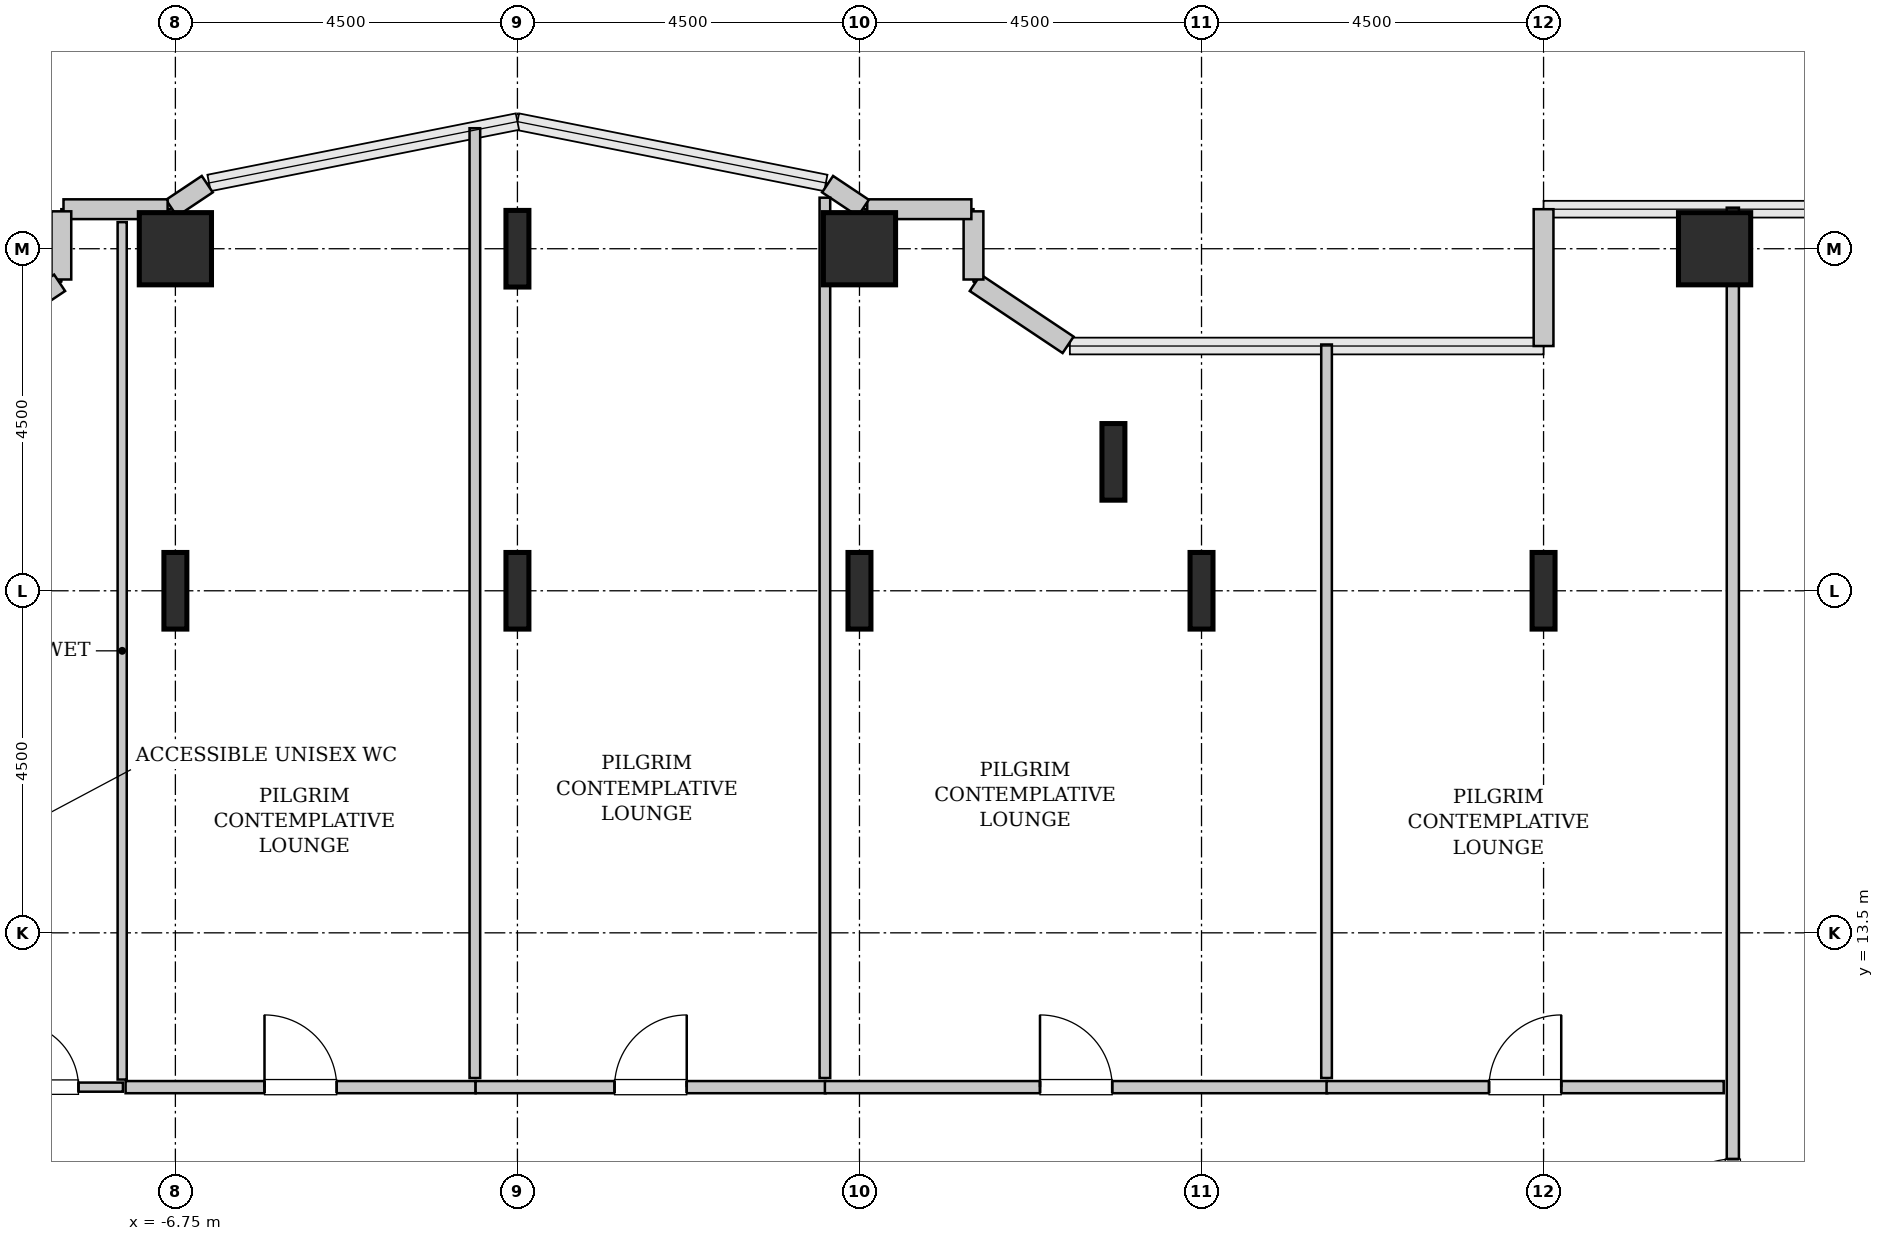
"""IFC4 building model, lengths in metres.
Left out: names, types, materials, properties, quantities, classifications, styles, units other than length and angle.
Written with IfcOpenShell. Run it as: python <this file> out.ifc"""

import sys

from ifc_helpers import new_model, si_unit, direction, frame, frame_2d, origin, origin_2d, place, context, subcontext, project, spatial, rectangle, hollow_rectangle, i_section, extrude, source, transform, mapped, element, fill, save


model = new_model("IFC4")
c1 = context("Model", 3, precision=1e-05, world=origin(), true_north=direction((0.0, 1.0)))
c2 = subcontext(c1, "Body", "Model", "MODEL_VIEW")
j1 = project(units=[si_unit("LENGTHUNIT", "METRE"), si_unit("PLANEANGLEUNIT", "RADIAN")], contexts=[c1])
p1 = place(None, origin())
s1 = spatial("IfcSite", under=j1, at=p1, CompositionType="ELEMENT")
p2 = place(p1, origin())
s2 = spatial("IfcBuilding", under=s1, at=p2, CompositionType="ELEMENT")
p3 = place(p2, frame((0.0, 0.0, 71.0)))
s3 = spatial("IfcBuildingStorey", under=s2, at=p3, CompositionType="ELEMENT", Elevation=71.0)
m1 = source(origin(), c2, "Body", "SweptSolid", [
    extrude(i_section(OverallWidth=0.302, OverallDepth=1.008, WebThickness=0.021, FlangeThickness=0.04, FilletRadius=0.03, at=origin_2d()), origin(), (0.0, 0.0, 1.0), 3.8),
])
p4 = place(p3, frame((-6.75, 18.0, 0.0), z_axis=(0.0, 0.0, 1.0), x_axis=(1.0, 0.0, 0.0)))
e1 = element("IfcColumn", 1, at=p4, inside=s3, PredefinedType="COLUMN", context=c2, shape_type="MappedRepresentation", body=[
    mapped(m1, transform((0.0, 0.0, 0.0), x_axis=(1.0, 0.0, 0.0), y_axis=(0.0, 1.0, 0.0), z_axis=(0.0, 0.0, 1.0), scale=1.0)),
])
m2 = source(origin(), c2, "Body", "SweptSolid", [
    extrude(hollow_rectangle(XDim=0.95, YDim=0.95, WallThickness=0.045, InnerFilletRadius=0.045, OuterFilletRadius=0.09, at=origin_2d()), origin(), (0.0, 0.0, 1.0), 3.8),
])
p5 = place(p3, frame((-6.75, 22.5, 0.0), z_axis=(0.0, 0.0, 1.0), x_axis=(1.0, 0.0, 0.0)))
e2 = element("IfcColumn", 2, at=p5, inside=s3, PredefinedType="COLUMN", context=c2, shape_type="MappedRepresentation", body=[
    mapped(m2, transform((0.0, 0.0, 0.0), x_axis=(1.0, 0.0, 0.0), y_axis=(0.0, 1.0, 0.0), z_axis=(0.0, 0.0, 1.0), scale=1.0)),
])
for number, where, z_axis, x_axis in (
    (3, (-2.25, 18.0, 0.0), (0.0, 0.0, 1.0), (1.0, 0.0, 0.0)),
    (4, (-2.25, 22.5, 0.0), (0.0, 0.0, 1.0), (1.0, 0.0, 0.0)),
    (5, (2.25, 18.0, 0.0), (0.0, 0.0, 1.0), (1.0, 0.0, 0.0)),
):
    element("IfcColumn", number, at=place(p3, frame(where, z_axis=z_axis, x_axis=x_axis)), inside=s3, PredefinedType="COLUMN", context=c2, shape_type="MappedRepresentation", body=[
        mapped(m1, transform((0.0, 0.0, 0.0), x_axis=(1.0, 0.0, 0.0), y_axis=(0.0, 1.0, 0.0), z_axis=(0.0, 0.0, 1.0), scale=1.0)),
    ])
p6 = place(p3, frame((2.25, 22.5, 0.0), z_axis=(0.0, 0.0, 1.0), x_axis=(1.0, 0.0, 0.0)))
e6 = element("IfcColumn", 6, at=p6, inside=s3, PredefinedType="COLUMN", context=c2, shape_type="MappedRepresentation", body=[
    mapped(m2, transform((0.0, 0.0, 0.0), x_axis=(1.0, 0.0, 0.0), y_axis=(0.0, 1.0, 0.0), z_axis=(0.0, 0.0, 1.0), scale=1.0)),
])
for number, where, z_axis, x_axis in (
    (7, (5.591, 19.696, 0.0), (0.0, 0.0, 1.0), (1.0, 0.0, 0.0)),
    (8, (6.75, 18.0, 0.0), (0.0, 0.0, 1.0), (1.0, 0.0, 0.0)),
    (9, (11.25, 18.0, 0.0), (0.0, 0.0, 1.0), (1.0, 0.0, 0.0)),
):
    element("IfcColumn", number, at=place(p3, frame(where, z_axis=z_axis, x_axis=x_axis)), inside=s3, PredefinedType="COLUMN", context=c2, shape_type="MappedRepresentation", body=[
        mapped(m1, transform((0.0, 0.0, 0.0), x_axis=(1.0, 0.0, 0.0), y_axis=(0.0, 1.0, 0.0), z_axis=(0.0, 0.0, 1.0), scale=1.0)),
    ])
p7 = place(p3, frame((13.5, 22.5, 0.0), z_axis=(0.0, 0.0, 1.0), x_axis=(1.0, 0.0, 0.0)))
e10 = element("IfcColumn", 10, at=p7, inside=s3, PredefinedType="COLUMN", context=c2, shape_type="MappedRepresentation", body=[
    mapped(m2, transform((0.0, 0.0, 0.0), x_axis=(1.0, 0.0, 0.0), y_axis=(0.0, 1.0, 0.0), z_axis=(0.0, 0.0, 1.0), scale=1.0)),
])
m3 = source(origin(), c2, "Body", "SweptSolid", [
    extrude(rectangle(XDim=1.8, YDim=0.26, at=frame_2d((0.9, 0.0))), origin(), (0.0, 0.0, 1.0), 3.55),
])
p8 = place(p3, frame((11.25, 23.02, 0.0), z_axis=(0.0, 0.0, 1.0), x_axis=(0.0, -1.0, 0.0)))
e11 = element("IfcWall", 11, at=p8, inside=s3, PredefinedType="SOLIDWALL", context=c2, shape_type="MappedRepresentation", body=[
    mapped(m3, transform((0.0, 0.0, 0.0), x_axis=(1.0, 0.0, 0.0), y_axis=(0.0, 1.0, 0.0), z_axis=(0.0, 0.0, 1.0), scale=1.0)),
])
m4 = source(origin(), c2, "Body", "SweptSolid", [
    extrude(rectangle(XDim=1.469, YDim=0.26, at=frame_2d((0.734, 0.0))), origin(), (0.0, 0.0, 1.0), 3.55),
])
p9 = place(p3, frame((4.995, 21.236, 0.0), z_axis=(0.0, 0.0, 1.0), x_axis=(-0.831461760506, 0.555581983884, 0.0)))
e12 = element("IfcWall", 12, at=p9, inside=s3, PredefinedType="SOLIDWALL", context=c2, shape_type="MappedRepresentation", body=[
    mapped(m4, transform((0.0, 0.0, 0.0), x_axis=(1.0, 0.0, 0.0), y_axis=(0.0, 1.0, 0.0), z_axis=(0.0, 0.0, 1.0), scale=1.0)),
])
m5 = source(origin(), c2, "Body", "SweptSolid", [
    extrude(rectangle(XDim=0.897, YDim=0.26, at=frame_2d((0.448, 0.0))), origin(), (0.0, 0.0, 1.0), 3.55),
])
p10 = place(p3, frame((3.75, 22.095, 0.0), z_axis=(0.0, 0.0, 1.0), x_axis=(0.0, 1.0, 0.0)))
e13 = element("IfcWall", 13, at=p10, inside=s3, PredefinedType="SOLIDWALL", context=c2, shape_type="MappedRepresentation", body=[
    mapped(m5, transform((0.0, 0.0, 0.0), x_axis=(1.0, 0.0, 0.0), y_axis=(0.0, 1.0, 0.0), z_axis=(0.0, 0.0, 1.0), scale=1.0)),
])
m6 = source(origin(), c2, "Body", "SweptSolid", [
    extrude(rectangle(XDim=1.37, YDim=0.26, at=frame_2d((0.685, 0.0))), origin(), (0.0, 0.0, 1.0), 3.55),
])
p11 = place(p3, frame((3.722, 23.02, 0.0), z_axis=(0.0, 0.0, 1.0), x_axis=(-1.0, 0.0, 0.0)))
e14 = element("IfcWall", 14, at=p11, inside=s3, PredefinedType="SOLIDWALL", context=c2, shape_type="MappedRepresentation", body=[
    mapped(m6, transform((0.0, 0.0, 0.0), x_axis=(1.0, 0.0, 0.0), y_axis=(0.0, 1.0, 0.0), z_axis=(0.0, 0.0, 1.0), scale=1.0)),
])
m7 = source(origin(), c2, "Body", "SweptSolid", [
    extrude(rectangle(XDim=0.565, YDim=0.26, at=frame_2d((0.283, 0.0))), origin(), (0.0, 0.0, 1.0), 3.55),
])
for number, where, z_axis, x_axis in (
    (15, (2.301, 23.036, 0.0), (0.0, 0.0, 1.0), (-0.832, 0.555, 0.0)),
    (16, (-6.331, 23.35, 0.0), (0.0, 0.0, 1.0), (-0.832, -0.555, 0.0)),
):
    element("IfcWall", number, at=place(p3, frame(where, z_axis=z_axis, x_axis=x_axis)), inside=s3, PredefinedType="SOLIDWALL", context=c2, shape_type="MappedRepresentation", body=[
        mapped(m7, transform((0.0, 0.0, 0.0), x_axis=(1.0, 0.0, 0.0), y_axis=(0.0, 1.0, 0.0), z_axis=(0.0, 0.0, 1.0), scale=1.0)),
    ])
p12 = place(p3, frame((-6.852, 23.02, 0.0), z_axis=(0.0, 0.0, 1.0), x_axis=(-1.0, 0.0, 0.0)))
e17 = element("IfcWall", 17, at=p12, inside=s3, PredefinedType="SOLIDWALL", context=c2, shape_type="MappedRepresentation", body=[
    mapped(m6, transform((0.0, 0.0, 0.0), x_axis=(1.0, 0.0, 0.0), y_axis=(0.0, 1.0, 0.0), z_axis=(0.0, 0.0, 1.0), scale=1.0)),
])
p13 = place(p3, frame((-8.25, 22.992, 0.0), z_axis=(0.0, 0.0, 1.0), x_axis=(0.0, -1.0, 0.0)))
e18 = element("IfcWall", 18, at=p13, inside=s3, PredefinedType="SOLIDWALL", context=c2, shape_type="MappedRepresentation", body=[
    mapped(m5, transform((0.0, 0.0, 0.0), x_axis=(1.0, 0.0, 0.0), y_axis=(0.0, 1.0, 0.0), z_axis=(0.0, 0.0, 1.0), scale=1.0)),
])
p14 = place(p3, frame((-8.273, 22.052, 0.0), z_axis=(0.0, 0.0, 1.0), x_axis=(-0.831461760506, -0.555581983884, 0.0)))
e19 = element("IfcWall", 19, at=p14, inside=s3, PredefinedType="SOLIDWALL", context=c2, shape_type="MappedRepresentation", body=[
    mapped(m4, transform((0.0, 0.0, 0.0), x_axis=(1.0, 0.0, 0.0), y_axis=(0.0, 1.0, 0.0), z_axis=(0.0, 0.0, 1.0), scale=1.0)),
])
m8 = source(origin(), c2, "Body", "SweptSolid", [
    extrude(rectangle(XDim=2.02, YDim=0.12, at=frame_2d((1.01, 0.0))), origin(), (0.0, 0.0, 1.0), 3.535),
])
p15 = place(p3, frame((-9.46, 11.47, 0.0), z_axis=(0.0, 0.0, 1.0), x_axis=(1.0, 0.0, 0.0)))
e20 = element("IfcWall", 20, at=p15, inside=s3, PredefinedType="PLUMBINGWALL", context=c2, shape_type="MappedRepresentation", body=[
    mapped(m8, transform((0.0, 0.0, 0.0), x_axis=(1.0, 0.0, 0.0), y_axis=(0.0, 1.0, 0.0), z_axis=(0.0, 0.0, 1.0), scale=1.0)),
])
p16 = place(p15, frame((0.585, 0.0, 0.0)))
e21 = element("IfcOpeningElement", 21, at=p16, cuts=e20, PredefinedType="OPENING", context=c2, shape_type="SweptSolid", body=[
    extrude(rectangle(XDim=0.85, YDim=2.1, at=frame_2d((0.425, 1.05))), frame((0.0, 0.07, 0.0), z_axis=(0.0, -1.0, 0.0), x_axis=(1.0, 0.0, 0.0)), (0.0, 0.0, 1.0), 0.14),
])
m9 = source(origin(), c2, "Body", "SweptSolid", [
    extrude(rectangle(XDim=11.28, YDim=0.12, at=frame_2d((5.64, 0.0))), origin(), (0.0, 0.0, 1.0), 3.535),
])
p17 = place(p3, frame((-7.45, 11.57, 0.0), z_axis=(0.0, 0.0, 1.0), x_axis=(0.0, 1.0, 0.0)))
e22 = element("IfcWall", 22, at=p17, inside=s3, PredefinedType="PLUMBINGWALL", context=c2, shape_type="MappedRepresentation", body=[
    mapped(m9, transform((0.0, 0.0, 0.0), x_axis=(1.0, 0.0, 0.0), y_axis=(0.0, 1.0, 0.0), z_axis=(0.0, 0.0, 1.0), scale=1.0)),
])
m10 = source(origin(), c2, "Body", "SweptSolid", [
    extrude(rectangle(XDim=14.453, YDim=0.16, at=frame_2d((7.226, 0.0))), origin(), (0.0, 0.0, 1.0), 3.535),
])
p18 = place(p3, frame((13.74, 8.587, 0.0), z_axis=(0.0, 0.0, 1.0), x_axis=(0.0, 1.0, 0.0)))
e23 = element("IfcWall", 23, at=p18, inside=s3, PredefinedType="PARTITIONING", context=c2, shape_type="MappedRepresentation", body=[
    mapped(m10, transform((0.0, 0.0, 0.0), x_axis=(1.0, 0.0, 0.0), y_axis=(0.0, 1.0, 0.0), z_axis=(0.0, 0.0, 1.0), scale=1.0)),
])
p19 = place(p18, frame((0.986, 0.0, 0.0)))
e24 = element("IfcOpeningElement", 24, at=p19, cuts=e23, PredefinedType="OPENING", context=c2, shape_type="SweptSolid", body=[
    extrude(rectangle(XDim=0.95, YDim=2.1, at=frame_2d((0.475, 1.05))), frame((0.0, 0.09, 0.0), z_axis=(0.0, -1.0, 0.0), x_axis=(1.0, 0.0, 0.0)), (0.0, 0.0, 1.0), 0.18),
])
m11 = source(origin(), c2, "Body", "SweptSolid", [
    extrude(rectangle(XDim=4.605, YDim=0.16, at=frame_2d((2.302, 0.0))), origin(), (0.0, 0.0, 1.0), 3.535),
])
p20 = place(p3, frame((-7.405, 11.47, 0.0), z_axis=(0.0, 0.0, 1.0), x_axis=(1.0, 0.0, 0.0)))
e25 = element("IfcWall", 25, at=p20, inside=s3, PredefinedType="PARTITIONING", context=c2, shape_type="MappedRepresentation", body=[
    mapped(m11, transform((0.0, 0.0, 0.0), x_axis=(1.0, 0.0, 0.0), y_axis=(0.0, 1.0, 0.0), z_axis=(0.0, 0.0, 1.0), scale=1.0)),
])
p21 = place(p20, frame((1.827, 0.0, 0.0)))
e26 = element("IfcOpeningElement", 26, at=p21, cuts=e25, PredefinedType="OPENING", context=c2, shape_type="SweptSolid", body=[
    extrude(rectangle(XDim=0.95, YDim=2.1, at=frame_2d((0.475, 1.05))), frame((0.0, 0.09, 0.0), z_axis=(0.0, -1.0, 0.0), x_axis=(1.0, 0.0, 0.0)), (0.0, 0.0, 1.0), 0.18),
])
m12 = source(origin(), c2, "Body", "SweptSolid", [
    extrude(rectangle(XDim=12.495, YDim=0.14, at=frame_2d((6.248, 0.0))), origin(), (0.0, 0.0, 1.0), 3.535),
])
p22 = place(p3, frame((-2.81, 11.59, 0.0), z_axis=(0.0, 0.0, 1.0), x_axis=(0.0, 1.0, 0.0)))
e27 = element("IfcWall", 27, at=p22, inside=s3, PredefinedType="PARTITIONING", context=c2, shape_type="MappedRepresentation", body=[
    mapped(m12, transform((0.0, 0.0, 0.0), x_axis=(1.0, 0.0, 0.0), y_axis=(0.0, 1.0, 0.0), z_axis=(0.0, 0.0, 1.0), scale=1.0)),
])
p23 = place(p3, frame((-2.8, 11.47, 0.0), z_axis=(0.0, 0.0, 1.0), x_axis=(1.0, 0.0, 0.0)))
e28 = element("IfcWall", 28, at=p23, inside=s3, PredefinedType="PARTITIONING", context=c2, shape_type="MappedRepresentation", body=[
    mapped(m11, transform((0.0, 0.0, 0.0), x_axis=(1.0, 0.0, 0.0), y_axis=(0.0, 1.0, 0.0), z_axis=(0.0, 0.0, 1.0), scale=1.0)),
])
p24 = place(p23, frame((1.827, 0.0, 0.0)))
e29 = element("IfcOpeningElement", 29, at=p24, cuts=e28, PredefinedType="OPENING", context=c2, shape_type="SweptSolid", body=[
    extrude(rectangle(XDim=0.95, YDim=2.1, at=frame_2d((0.475, 1.05))), frame((0.0, 0.09, 0.0), z_axis=(0.0, -1.0, 0.0), x_axis=(1.0, 0.0, 0.0)), (0.0, 0.0, 1.0), 0.18),
])
m13 = source(origin(), c2, "Body", "SweptSolid", [
    extrude(rectangle(XDim=11.581, YDim=0.14, at=frame_2d((5.791, 0.0))), origin(), (0.0, 0.0, 1.0), 2.825),
])
p25 = place(p3, frame((1.795, 11.59, 0.0), z_axis=(0.0, 0.0, 1.0), x_axis=(0.0, 1.0, 0.0)))
e30 = element("IfcWall", 30, at=p25, inside=s3, PredefinedType="PARTITIONING", context=c2, shape_type="MappedRepresentation", body=[
    mapped(m13, transform((0.0, 0.0, 0.0), x_axis=(1.0, 0.0, 0.0), y_axis=(0.0, 1.0, 0.0), z_axis=(0.0, 0.0, 1.0), scale=1.0)),
])
m14 = source(origin(), c2, "Body", "SweptSolid", [
    extrude(rectangle(XDim=6.61, YDim=0.16, at=frame_2d((3.305, 0.0))), origin(), (0.0, 0.0, 1.0), 3.535),
])
p26 = place(p3, frame((1.795, 11.47, 0.0), z_axis=(0.0, 0.0, 1.0), x_axis=(1.0, 0.0, 0.0)))
e31 = element("IfcWall", 31, at=p26, inside=s3, PredefinedType="PARTITIONING", context=c2, shape_type="MappedRepresentation", body=[
    mapped(m14, transform((0.0, 0.0, 0.0), x_axis=(1.0, 0.0, 0.0), y_axis=(0.0, 1.0, 0.0), z_axis=(0.0, 0.0, 1.0), scale=1.0)),
])
p27 = place(p26, frame((2.83, 0.0, 0.0)))
e32 = element("IfcOpeningElement", 32, at=p27, cuts=e31, PredefinedType="OPENING", context=c2, shape_type="SweptSolid", body=[
    extrude(rectangle(XDim=0.95, YDim=2.1, at=frame_2d((0.475, 1.05))), frame((0.0, 0.09, 0.0), z_axis=(0.0, -1.0, 0.0), x_axis=(1.0, 0.0, 0.0)), (0.0, 0.0, 1.0), 0.18),
])
m15 = source(origin(), c2, "Body", "SweptSolid", [
    extrude(rectangle(XDim=9.65, YDim=0.14, at=frame_2d((4.825, 0.0))), origin(), (0.0, 0.0, 1.0), 3.535),
])
p28 = place(p3, frame((8.395, 11.59, 0.0), z_axis=(0.0, 0.0, 1.0), x_axis=(0.0, 1.0, 0.0)))
e33 = element("IfcWall", 33, at=p28, inside=s3, PredefinedType="PARTITIONING", context=c2, shape_type="MappedRepresentation", body=[
    mapped(m15, transform((0.0, 0.0, 0.0), x_axis=(1.0, 0.0, 0.0), y_axis=(0.0, 1.0, 0.0), z_axis=(0.0, 0.0, 1.0), scale=1.0)),
])
m16 = source(origin(), c2, "Body", "SweptSolid", [
    extrude(rectangle(XDim=5.225, YDim=0.16, at=frame_2d((2.613, 0.0))), origin(), (0.0, 0.0, 1.0), 3.535),
])
p29 = place(p3, frame((8.395, 11.47, 0.0), z_axis=(0.0, 0.0, 1.0), x_axis=(1.0, 0.0, 0.0)))
e34 = element("IfcWall", 34, at=p29, inside=s3, PredefinedType="PARTITIONING", context=c2, shape_type="MappedRepresentation", body=[
    mapped(m16, transform((0.0, 0.0, 0.0), x_axis=(1.0, 0.0, 0.0), y_axis=(0.0, 1.0, 0.0), z_axis=(0.0, 0.0, 1.0), scale=1.0)),
])
p30 = place(p29, frame((2.137, 0.0, 0.0)))
e35 = element("IfcOpeningElement", 35, at=p30, cuts=e34, PredefinedType="OPENING", context=c2, shape_type="SweptSolid", body=[
    extrude(rectangle(XDim=0.95, YDim=2.1, at=frame_2d((0.475, 1.05))), frame((0.0, 0.09, 0.0), z_axis=(0.0, -1.0, 0.0), x_axis=(1.0, 0.0, 0.0)), (0.0, 0.0, 1.0), 0.18),
])
m17 = source(origin(), c2, "Body", "SweptSolid", [
    extrude(rectangle(XDim=0.85, YDim=2.1, at=frame_2d((0.425, 1.05))), frame((0.0, 0.025, 0.0), z_axis=(0.0, -1.0, 0.0), x_axis=(1.0, 0.0, 0.0)), (0.0, 0.0, 1.0), 0.05),
])
p31 = place(p16, origin())
e36 = element("IfcDoor", 36, at=p31, inside=s3, OperationType="SINGLE_SWING_LEFT", PredefinedType="DOOR", context=c2, shape_type="MappedRepresentation", body=[
    mapped(m17, transform((0.0, 0.0, 0.0), x_axis=(1.0, 0.0, 0.0), y_axis=(0.0, 1.0, 0.0), z_axis=(0.0, 0.0, 1.0), scale=1.0)),
])
fill(e21, e36)
m18 = source(origin(), c2, "Body", "SweptSolid", [
    extrude(rectangle(XDim=0.95, YDim=2.1, at=frame_2d((0.475, 1.05))), frame((0.0, 0.025, 0.0), z_axis=(0.0, -1.0, 0.0), x_axis=(1.0, 0.0, 0.0)), (0.0, 0.0, 1.0), 0.05),
])
p32 = place(p19, origin())
e37 = element("IfcDoor", 37, at=p32, inside=s3, OperationType="SINGLE_SWING_LEFT", PredefinedType="DOOR", context=c2, shape_type="MappedRepresentation", body=[
    mapped(m18, transform((0.0, 0.0, 0.0), x_axis=(1.0, 0.0, 0.0), y_axis=(0.0, 1.0, 0.0), z_axis=(0.0, 0.0, 1.0), scale=1.0)),
])
fill(e24, e37)
p33 = place(p21, origin())
e38 = element("IfcDoor", 38, at=p33, inside=s3, OperationType="SINGLE_SWING_LEFT", PredefinedType="DOOR", context=c2, shape_type="MappedRepresentation", body=[
    mapped(m18, transform((0.0, 0.0, 0.0), x_axis=(1.0, 0.0, 0.0), y_axis=(0.0, 1.0, 0.0), z_axis=(0.0, 0.0, 1.0), scale=1.0)),
])
fill(e26, e38)
p34 = place(p24, origin())
e39 = element("IfcDoor", 39, at=p34, inside=s3, OperationType="SINGLE_SWING_RIGHT", PredefinedType="DOOR", context=c2, shape_type="MappedRepresentation", body=[
    mapped(m18, transform((0.0, 0.0, 0.0), x_axis=(1.0, 0.0, 0.0), y_axis=(0.0, 1.0, 0.0), z_axis=(0.0, 0.0, 1.0), scale=1.0)),
])
fill(e29, e39)
p35 = place(p27, origin())
e40 = element("IfcDoor", 40, at=p35, inside=s3, OperationType="SINGLE_SWING_LEFT", PredefinedType="DOOR", context=c2, shape_type="MappedRepresentation", body=[
    mapped(m18, transform((0.0, 0.0, 0.0), x_axis=(1.0, 0.0, 0.0), y_axis=(0.0, 1.0, 0.0), z_axis=(0.0, 0.0, 1.0), scale=1.0)),
])
fill(e32, e40)
p36 = place(p30, origin())
e41 = element("IfcDoor", 41, at=p36, inside=s3, OperationType="SINGLE_SWING_RIGHT", PredefinedType="DOOR", context=c2, shape_type="MappedRepresentation", body=[
    mapped(m18, transform((0.0, 0.0, 0.0), x_axis=(1.0, 0.0, 0.0), y_axis=(0.0, 1.0, 0.0), z_axis=(0.0, 0.0, 1.0), scale=1.0)),
])
fill(e35, e41)
save(model, sys.argv[1])
